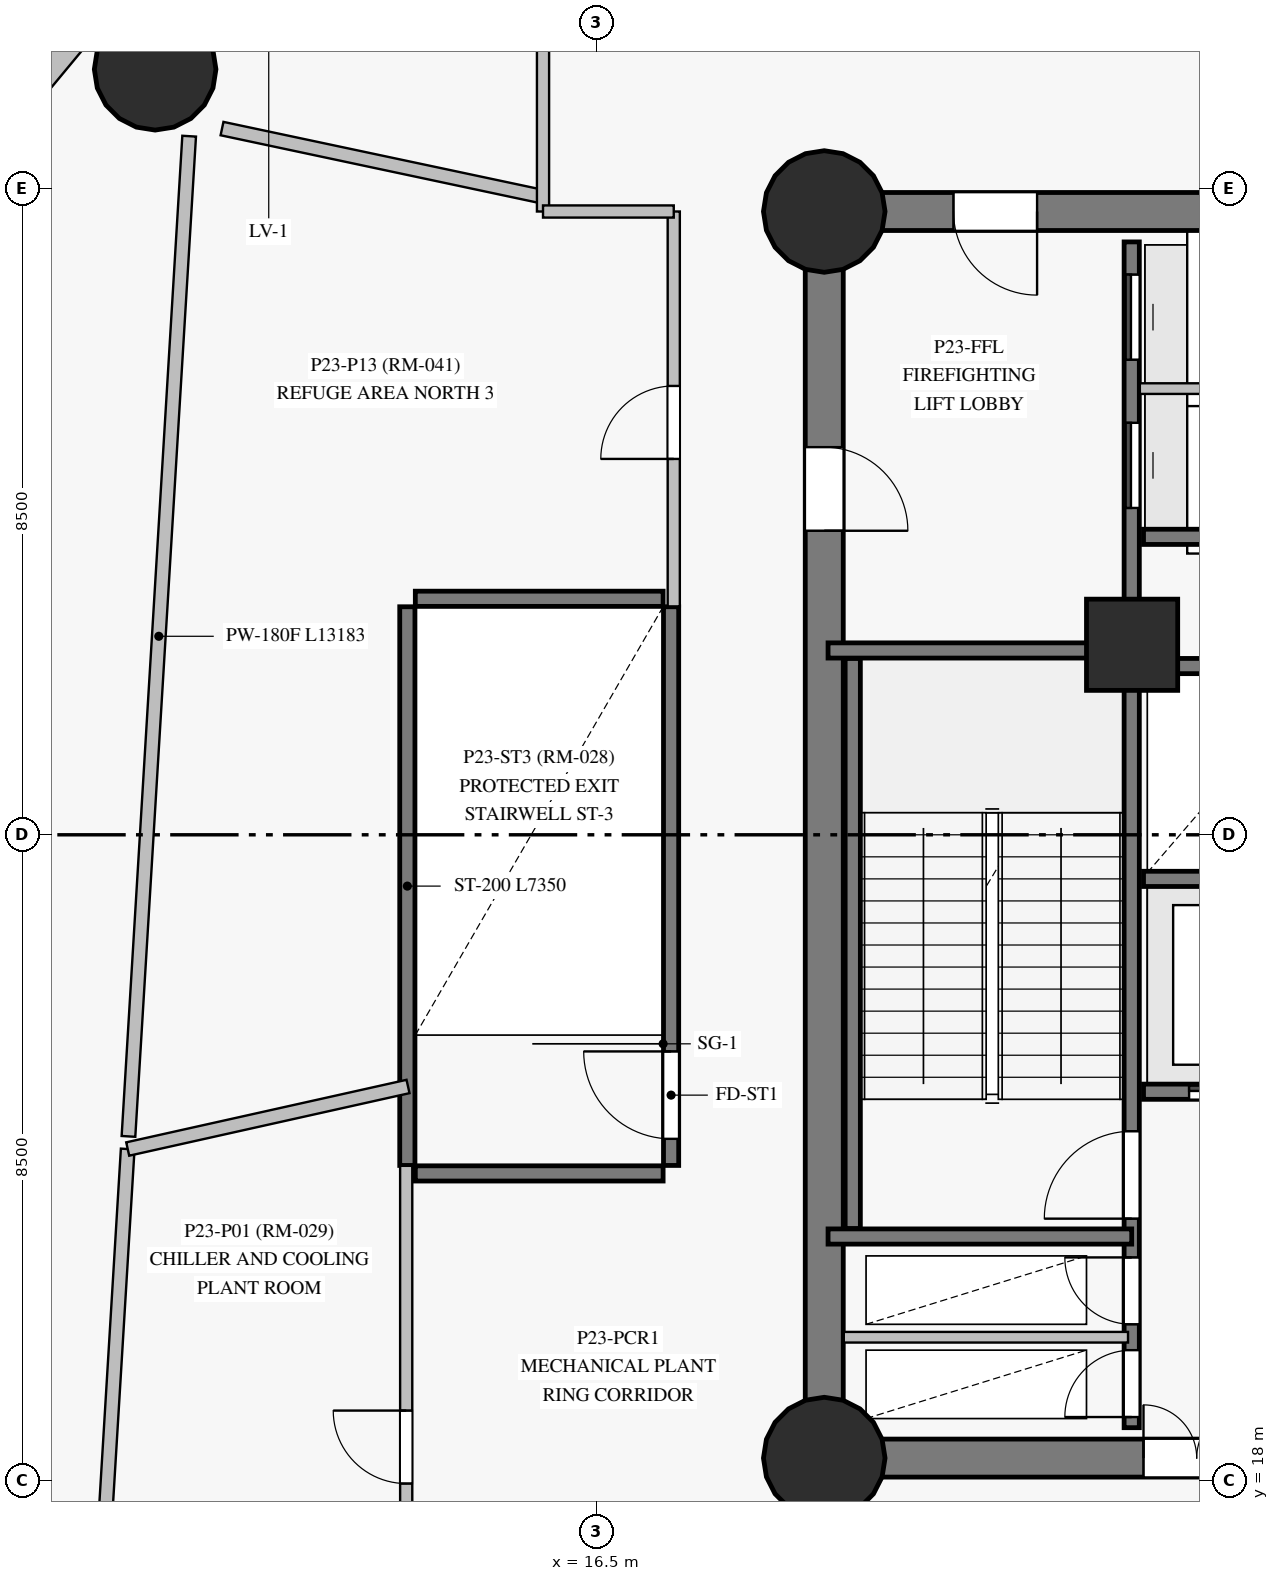
"""IFC4 building model, lengths in metres.
Left out: names, types, materials, properties, quantities, classifications, styles, units other than length and angle.
Written with IfcOpenShell. Run it as: python <this file> out.ifc"""

import sys

from ifc_helpers import new_model, si_unit, direction, frame, frame_2d, origin, origin_with_axes, origin_2d, place, context, subcontext, project, spatial, rectangle, circle, extrude, source, transform, mapped, element, fill, save


model = new_model("IFC4")
c1 = context("Model", 3, precision=1e-05, world=origin(), true_north=direction((0.0, 1.0)))
c2 = subcontext(c1, "Body", "Model", "MODEL_VIEW")
j1 = project(units=[si_unit("LENGTHUNIT", "METRE"), si_unit("PLANEANGLEUNIT", "RADIAN")], contexts=[c1])
p1 = place(None, origin())
s1 = spatial("IfcSite", under=j1, at=p1, CompositionType="ELEMENT")
p2 = place(p1, origin())
s2 = spatial("IfcBuilding", under=s1, at=p2, CompositionType="ELEMENT")
p3 = place(p2, frame((0.0, 0.0, 87.7)))
s3 = spatial("IfcBuildingStorey", under=s2, at=p3, CompositionType="ELEMENT", Elevation=87.7)
p4 = place(p3, frame((19.5, 18.3, 0.0), z_axis=(0.0, 0.0, 1.0), x_axis=(1.0, 0.0, 0.0)))
e1 = element("IfcWall", 1, at=p4, inside=s3, PredefinedType="SHEAR", context=c2, shape_type="SweptSolid", body=[
    extrude(rectangle(XDim=7.05, YDim=0.5, at=frame_2d((3.525, 0.0))), origin(), (0.0, 0.0, 1.0), 4.275),
])
p5 = place(p4, frame((4.2, 0.0, 0.0)))
e2 = element("IfcOpeningElement", 2, at=p5, cuts=e1, PredefinedType="OPENING", context=c2, shape_type="SweptSolid", body=[
    extrude(rectangle(XDim=1.4, YDim=2.2, at=frame_2d((0.7, 1.1))), frame((0.0, 0.26, 0.0), z_axis=(0.0, -1.0, 0.0), x_axis=(1.0, 0.0, 0.0)), (0.0, 0.0, 1.0), 0.52),
])
p6 = place(p3, frame((26.55, 34.7, 0.0), z_axis=(0.0, 0.0, 1.0), x_axis=(-1.0, 0.0, 0.0)))
e3 = element("IfcWall", 3, at=p6, inside=s3, PredefinedType="SHEAR", context=c2, shape_type="SweptSolid", body=[
    extrude(rectangle(XDim=7.05, YDim=0.5, at=frame_2d((3.525, 0.0))), origin(), (0.0, 0.0, 1.0), 4.275),
])
p7 = place(p6, frame((4.25, 0.0, 0.0)))
e4 = element("IfcOpeningElement", 4, at=p7, cuts=e3, PredefinedType="OPENING", context=c2, shape_type="SweptSolid", body=[
    extrude(rectangle(XDim=1.1, YDim=2.15, at=frame_2d((0.55, 1.075))), frame((0.0, 0.26, 0.0), z_axis=(0.0, -1.0, 0.0), x_axis=(1.0, 0.0, 0.0)), (0.0, 0.0, 1.0), 0.52),
])
p8 = place(p3, frame((19.5, 34.7, 0.0), z_axis=(0.0, 0.0, 1.0), x_axis=(0.0, -1.0, 0.0)))
e5 = element("IfcWall", 5, at=p8, inside=s3, PredefinedType="SHEAR", context=c2, shape_type="SweptSolid", body=[
    extrude(rectangle(XDim=16.4, YDim=0.5, at=frame_2d((8.2, 0.0))), origin(), (0.0, 0.0, 1.0), 4.275),
])
p9 = place(p8, frame((3.1, 0.0, 0.0)))
e6 = element("IfcOpeningElement", 6, at=p9, cuts=e5, PredefinedType="OPENING", context=c2, shape_type="SweptSolid", body=[
    extrude(rectangle(XDim=1.1, YDim=2.15, at=frame_2d((0.55, 1.075))), frame((0.0, 0.26, 0.0), z_axis=(0.0, -1.0, 0.0), x_axis=(1.0, 0.0, 0.0)), (0.0, 0.0, 1.0), 0.52),
])
m1 = source(origin_with_axes(), c2, "Body", "SweptSolid", [
    extrude(circle(Radius=0.8, at=origin_2d()), origin(), (0.0, 0.0, 1.0), 4.5),
])
for number, where, z_axis, x_axis in (
    (7, (19.5, 18.3, 0.0), (0.0, 0.0, 1.0), (1.0, 0.0, 0.0)),
    (8, (19.5, 34.7, 0.0), (0.0, 0.0, 1.0), (1.0, 0.0, 0.0)),
):
    element("IfcColumn", number, at=place(p3, frame(where, z_axis=z_axis, x_axis=x_axis)), inside=s3, PredefinedType="COLUMN", context=c2, shape_type="MappedRepresentation", body=[
        mapped(m1, transform((0.0, 0.0, 0.0), scale=1.0)),
    ])
m2 = source(origin_with_axes(), c2, "Body", "SweptSolid", [
    extrude(rectangle(XDim=1.2, YDim=1.2, at=origin_2d()), origin(), (0.0, 0.0, 1.0), 4.5),
])
p10 = place(p3, frame((23.55, 29.0, 0.0), z_axis=(0.0, 0.0, 1.0), x_axis=(1.0, 0.0, 0.0)))
e9 = element("IfcColumn", 9, at=p10, inside=s3, PredefinedType="COLUMN", context=c2, shape_type="MappedRepresentation", body=[
    mapped(m2, transform((0.0, 0.0, 0.0), scale=1.0)),
])
p11 = place(p3, frame((10.697, 36.571, 0.0), z_axis=(0.0, 0.0, 1.0), x_axis=(1.0, 0.0, 0.0)))
e10 = element("IfcColumn", 10, at=p11, inside=s3, PredefinedType="COLUMN", context=c2, shape_type="MappedRepresentation", body=[
    mapped(m1, transform((0.0, 0.0, 0.0), scale=1.0)),
])
p12 = place(p3, frame((15.915, 44.518, 0.0), z_axis=(0.0, 0.0, 1.0), x_axis=(-0.638496499315, -0.76962472697, 0.0)))
e11 = element("IfcWall", 11, at=p12, inside=s3, PredefinedType="SOLIDWALL", context=c2, shape_type="SweptSolid", body=[
    extrude(rectangle(XDim=11.663, YDim=0.32, at=frame_2d((5.831, 0.0))), origin(), (0.0, 0.0, 1.0), 4.275),
])
p13 = place(p3, frame((23.545, 18.7, 0.0), z_axis=(0.0, 0.0, 1.0), x_axis=(0.0, 1.0, 0.0)))
e12 = element("IfcWall", 12, at=p13, inside=s3, PredefinedType="SHEAR", context=c2, shape_type="SweptSolid", body=[
    extrude(rectangle(XDim=15.6, YDim=0.2, at=frame_2d((7.8, 0.0))), origin(), (0.0, 0.0, 1.0), 4.275),
])
p14 = place(p13, frame((2.75, 0.0, 0.0)))
e13 = element("IfcOpeningElement", 13, at=p14, cuts=e12, PredefinedType="OPENING", context=c2, shape_type="SweptSolid", body=[
    extrude(rectangle(XDim=1.15, YDim=2.15, at=frame_2d((0.575, 1.075))), frame((0.0, 0.11, 0.0), z_axis=(0.0, -1.0, 0.0), x_axis=(1.0, 0.0, 0.0)), (0.0, 0.0, 1.0), 0.22),
])
p15 = place(p13, frame((0.14, 0.0, 0.0)))
e14 = element("IfcOpeningElement", 14, at=p15, cuts=e12, PredefinedType="OPENING", context=c2, shape_type="SweptSolid", body=[
    extrude(rectangle(XDim=0.88, YDim=2.1, at=frame_2d((0.44, 1.05))), frame((0.0, 0.11, 0.0), z_axis=(0.0, -1.0, 0.0), x_axis=(1.0, 0.0, 0.0)), (0.0, 0.0, 1.0), 0.22),
])
p16 = place(p13, frame((1.36, 0.0, 0.0)))
e15 = element("IfcOpeningElement", 15, at=p16, cuts=e12, PredefinedType="OPENING", context=c2, shape_type="SweptSolid", body=[
    extrude(rectangle(XDim=0.88, YDim=2.1, at=frame_2d((0.44, 1.05))), frame((0.0, 0.11, 0.0), z_axis=(0.0, -1.0, 0.0), x_axis=(1.0, 0.0, 0.0)), (0.0, 0.0, 1.0), 0.22),
])
p17 = place(p13, frame((12.1, 0.0, 0.0)))
e16 = element("IfcOpeningElement", 16, at=p17, cuts=e12, PredefinedType="OPENING", context=c2, shape_type="SweptSolid", body=[
    extrude(rectangle(XDim=1.12, YDim=2.15, at=frame_2d((0.56, 1.075))), frame((0.0, 0.11, 0.0), z_axis=(0.0, -1.0, 0.0), x_axis=(1.0, 0.0, 0.0)), (0.0, 0.0, 1.0), 0.22),
])
p18 = place(p13, frame((14.05, 0.0, 0.0)))
e17 = element("IfcOpeningElement", 17, at=p18, cuts=e12, PredefinedType="OPENING", context=c2, shape_type="SweptSolid", body=[
    extrude(rectangle(XDim=1.12, YDim=2.15, at=frame_2d((0.56, 1.075))), frame((0.0, 0.11, 0.0), z_axis=(0.0, -1.0, 0.0), x_axis=(1.0, 0.0, 0.0)), (0.0, 0.0, 1.0), 0.22),
])
p19 = place(p3, frame((23.7, 23.12, 0.0), z_axis=(0.0, 0.0, 1.0), x_axis=(1.0, 0.0, 0.0)))
e18 = element("IfcWall", 18, at=p19, inside=s3, PredefinedType="SHEAR", context=c2, shape_type="SweptSolid", body=[
    extrude(rectangle(XDim=9.6, YDim=0.2, at=frame_2d((4.8, 0.0))), origin(), (0.0, 0.0, 1.0), 4.275),
])
p20 = place(p19, frame((0.6, 0.0, 0.0)))
e19 = element("IfcOpeningElement", 19, at=p20, cuts=e18, PredefinedType="OPENING", context=c2, shape_type="SweptSolid", body=[
    extrude(rectangle(XDim=1.1, YDim=2.15, at=frame_2d((0.55, 1.075))), frame((0.0, 0.11, 0.0), z_axis=(0.0, -1.0, 0.0), x_axis=(1.0, 0.0, 0.0)), (0.0, 0.0, 1.0), 0.22),
])
p21 = place(p19, frame((2.98, 0.0, 0.0)))
e20 = element("IfcOpeningElement", 20, at=p21, cuts=e18, PredefinedType="OPENING", context=c2, shape_type="SweptSolid", body=[
    extrude(rectangle(XDim=1.1, YDim=2.15, at=frame_2d((0.55, 1.075))), frame((0.0, 0.11, 0.0), z_axis=(0.0, -1.0, 0.0), x_axis=(1.0, 0.0, 0.0)), (0.0, 0.0, 1.0), 0.22),
])
p22 = place(p19, frame((5.36, 0.0, 0.0)))
e21 = element("IfcOpeningElement", 21, at=p22, cuts=e18, PredefinedType="OPENING", context=c2, shape_type="SweptSolid", body=[
    extrude(rectangle(XDim=1.1, YDim=2.15, at=frame_2d((0.55, 1.075))), frame((0.0, 0.11, 0.0), z_axis=(0.0, -1.0, 0.0), x_axis=(1.0, 0.0, 0.0)), (0.0, 0.0, 1.0), 0.22),
])
p23 = place(p19, frame((7.74, 0.0, 0.0)))
e22 = element("IfcOpeningElement", 22, at=p23, cuts=e18, PredefinedType="OPENING", context=c2, shape_type="SweptSolid", body=[
    extrude(rectangle(XDim=1.1, YDim=2.15, at=frame_2d((0.55, 1.075))), frame((0.0, 0.11, 0.0), z_axis=(0.0, -1.0, 0.0), x_axis=(1.0, 0.0, 0.0)), (0.0, 0.0, 1.0), 0.22),
])
for number, where, z_axis, x_axis in (
    (23, (23.7, 25.92, 0.0), (0.0, 0.0, 1.0), (1.0, 0.0, 0.0)),
    (24, (23.7, 28.72, 0.0), (0.0, 0.0, 1.0), (1.0, 0.0, 0.0)),
):
    element("IfcWall", number, at=place(p3, frame(where, z_axis=z_axis, x_axis=x_axis)), inside=s3, PredefinedType="SHEAR", context=c2, shape_type="SweptSolid", body=[
        extrude(rectangle(XDim=9.6, YDim=0.2, at=frame_2d((4.8, 0.0))), origin(), (0.0, 0.0, 1.0), 4.275),
    ])
p24 = place(p3, frame((19.875, 21.32, 0.0), z_axis=(0.0, 0.0, 1.0), x_axis=(0.0, 1.0, 0.0)))
e25 = element("IfcWall", 25, at=p24, inside=s3, PredefinedType="SHEAR", context=c2, shape_type="SweptSolid", body=[
    extrude(rectangle(XDim=7.5, YDim=0.2, at=frame_2d((3.75, 0.0))), origin(), (0.0, 0.0, 1.0), 4.275),
])
p25 = place(p3, frame((14.015, 22.15, 0.0), z_axis=(0.0, 0.0, 1.0), x_axis=(0.0, 1.0, 0.0)))
e26 = element("IfcWall", 26, at=p25, inside=s3, PredefinedType="SHEAR", context=c2, shape_type="SweptSolid", body=[
    extrude(rectangle(XDim=7.35, YDim=0.2, at=frame_2d((3.675, 0.0))), origin(), (0.0, 0.0, 1.0), 4.275),
])
p26 = place(p3, frame((17.485, 22.15, 0.0), z_axis=(0.0, 0.0, 1.0), x_axis=(0.0, 1.0, 0.0)))
e27 = element("IfcWall", 27, at=p26, inside=s3, PredefinedType="SHEAR", context=c2, shape_type="SweptSolid", body=[
    extrude(rectangle(XDim=7.35, YDim=0.2, at=frame_2d((3.675, 0.0))), origin(), (0.0, 0.0, 1.0), 4.275),
])
p27 = place(p26, frame((0.35, 0.0, 0.0)))
e28 = element("IfcOpeningElement", 28, at=p27, cuts=e27, PredefinedType="OPENING", context=c2, shape_type="SweptSolid", body=[
    extrude(rectangle(XDim=1.15, YDim=2.15, at=frame_2d((0.575, 1.075))), frame((0.0, 0.11, 0.0), z_axis=(0.0, -1.0, 0.0), x_axis=(1.0, 0.0, 0.0)), (0.0, 0.0, 1.0), 0.22),
])
for number, where, z_axis, x_axis in (
    (29, (19.55, 21.215, 0.0), (0.0, 0.0, 1.0), (1.0, 0.0, 0.0)),
    (30, (19.55, 28.925, 0.0), (0.0, 0.0, 1.0), (1.0, 0.0, 0.0)),
):
    element("IfcWall", number, at=place(p3, frame(where, z_axis=z_axis, x_axis=x_axis)), inside=s3, PredefinedType="SHEAR", context=c2, shape_type="SweptSolid", body=[
        extrude(rectangle(XDim=3.995, YDim=0.2, at=frame_2d((1.998, 0.0))), origin(), (0.0, 0.0, 1.0), 4.275),
    ])
for number, where, z_axis, x_axis in (
    (31, (14.12, 22.045, 0.0), (0.0, 0.0, 1.0), (1.0, 0.0, 0.0)),
    (32, (14.12, 29.605, 0.0), (0.0, 0.0, 1.0), (1.0, 0.0, 0.0)),
):
    element("IfcWall", number, at=place(p3, frame(where, z_axis=z_axis, x_axis=x_axis)), inside=s3, PredefinedType="SHEAR", context=c2, shape_type="SweptSolid", body=[
        extrude(rectangle(XDim=3.26, YDim=0.2, at=frame_2d((1.63, 0.0))), origin(), (0.0, 0.0, 1.0), 4.275),
    ])
p28 = place(p3, frame((23.7, 30.42, 0.0), z_axis=(0.0, 0.0, 1.0), x_axis=(1.0, 0.0, 0.0)))
e33 = element("IfcWall", 33, at=p28, inside=s3, PredefinedType="SHEAR", context=c2, shape_type="SweptSolid", body=[
    extrude(rectangle(XDim=2.78, YDim=0.2, at=frame_2d((1.39, 0.0))), origin(), (0.0, 0.0, 1.0), 4.275),
])
p29 = place(p3, frame((10.346, 22.532, 0.0), z_axis=(0.0, 0.0, 1.0), x_axis=(0.060558802641, 0.998164631422, 0.0)))
e34 = element("IfcWall", 34, at=p29, inside=s3, PredefinedType="PARTITIONING", context=c2, shape_type="SweptSolid", body=[
    extrude(rectangle(XDim=13.183, YDim=0.18, at=frame_2d((6.591, 0.0))), origin(), (0.0, 0.0, 1.0), 3.375),
])
p30 = place(p3, frame((9.817, 13.808, 0.0), z_axis=(0.0, 0.0, 1.0), x_axis=(0.060568138709, 0.998164064958, 0.0)))
e35 = element("IfcWall", 35, at=p30, inside=s3, PredefinedType="PARTITIONING", context=c2, shape_type="SweptSolid", body=[
    extrude(rectangle(XDim=8.573, YDim=0.18, at=frame_2d((4.287, 0.0))), origin(), (0.0, 0.0, 1.0), 3.375),
])
p31 = place(p3, frame((14.0, 15.1, 0.0), z_axis=(0.0, 0.0, 1.0), x_axis=(0.0, 1.0, 0.0)))
e36 = element("IfcWall", 36, at=p31, inside=s3, PredefinedType="PARTITIONING", context=c2, shape_type="SweptSolid", body=[
    extrude(rectangle(XDim=7.045, YDim=0.16, at=frame_2d((3.522, 0.0))), origin(), (0.0, 0.0, 1.0), 4.275),
])
p32 = place(p31, frame((2.865, 0.0, 0.0)))
e37 = element("IfcOpeningElement", 37, at=p32, cuts=e36, PredefinedType="OPENING", context=c2, shape_type="SweptSolid", body=[
    extrude(rectangle(XDim=0.96, YDim=2.15, at=frame_2d((0.48, 1.075))), frame((0.0, 0.09, 0.0), z_axis=(0.0, -1.0, 0.0), x_axis=(1.0, 0.0, 0.0)), (0.0, 0.0, 1.0), 0.18),
])
p33 = place(p3, frame((17.52, 29.505, 0.0), z_axis=(0.0, 0.0, 1.0), x_axis=(0.0, 1.0, 0.0)))
e38 = element("IfcWall", 38, at=p33, inside=s3, PredefinedType="PARTITIONING", context=c2, shape_type="SweptSolid", body=[
    extrude(rectangle(XDim=5.195, YDim=0.16, at=frame_2d((2.598, 0.0))), origin(), (0.0, 0.0, 1.0), 4.275),
])
p34 = place(p33, frame((1.94, 0.0, 0.0)))
e39 = element("IfcOpeningElement", 39, at=p34, cuts=e38, PredefinedType="OPENING", context=c2, shape_type="SweptSolid", body=[
    extrude(rectangle(XDim=0.96, YDim=2.15, at=frame_2d((0.48, 1.075))), frame((0.0, 0.09, 0.0), z_axis=(0.0, -1.0, 0.0), x_axis=(1.0, 0.0, 0.0)), (0.0, 0.0, 1.0), 0.18),
])
p35 = place(p3, frame((11.577, 35.791, 0.0), z_axis=(0.0, 0.0, 1.0), x_axis=(0.978151143178, -0.20789502423, 0.0)))
e40 = element("IfcWall", 40, at=p35, inside=s3, PredefinedType="PARTITIONING", context=c2, shape_type="SweptSolid", body=[
    extrude(rectangle(XDim=4.347, YDim=0.18, at=frame_2d((2.174, 0.0))), origin(), (0.0, 0.0, 1.0), 2.775),
])
p36 = place(p3, frame((10.336, 22.366, 0.0), z_axis=(0.0, 0.0, 1.0), x_axis=(0.976004273592, 0.21775136723, 0.0)))
e41 = element("IfcWall", 41, at=p36, inside=s3, PredefinedType="PARTITIONING", context=c2, shape_type="SweptSolid", body=[
    extrude(rectangle(XDim=3.778, YDim=0.18, at=frame_2d((1.889, 0.0))), origin(), (0.0, 0.0, 1.0), 4.275),
])
p37 = place(p3, frame((19.757, 19.89, 0.0), z_axis=(0.0, 0.0, 1.0), x_axis=(1.0, 0.0, 0.0)))
e42 = element("IfcWall", 42, at=p37, inside=s3, PredefinedType="PARTITIONING", context=c2, shape_type="SweptSolid", body=[
    extrude(rectangle(XDim=3.739, YDim=0.14, at=frame_2d((1.87, 0.0))), origin(), (0.0, 0.0, 1.0), 4.275),
])
p38 = place(p3, frame((15.8, 34.7, 0.0), z_axis=(0.0, 0.0, 1.0), x_axis=(0.0, 1.0, 0.0)))
e43 = element("IfcWall", 43, at=p38, inside=s3, PredefinedType="PARTITIONING", context=c2, shape_type="SweptSolid", body=[
    extrude(rectangle(XDim=3.4, YDim=0.16, at=frame_2d((1.7, 0.0))), origin(), (0.0, 0.0, 1.0), 2.875),
])
p39 = place(p3, frame((23.652, 32.37, 0.0), z_axis=(0.0, 0.0, 1.0), x_axis=(1.0, 0.0, 0.0)))
e44 = element("IfcWall", 44, at=p39, inside=s3, PredefinedType="PARTITIONING", context=c2, shape_type="SweptSolid", body=[
    extrude(rectangle(XDim=2.828, YDim=0.14, at=frame_2d((1.414, 0.0))), origin(), (0.0, 0.0, 1.0), 4.275),
])
p40 = place(p3, frame((17.52, 34.7, 0.0), z_axis=(0.0, 0.0, 1.0), x_axis=(-1.0, 0.0, 0.0)))
e45 = element("IfcWall", 45, at=p40, inside=s3, PredefinedType="PARTITIONING", context=c2, shape_type="SweptSolid", body=[
    extrude(rectangle(XDim=1.72, YDim=0.16, at=frame_2d((0.86, 0.0))), origin(), (0.0, 0.0, 1.0), 2.775),
])
m3 = source(origin_with_axes(), c2, "Body", "SweptSolid", [
    extrude(rectangle(XDim=1.15, YDim=2.15, at=frame_2d((0.575, 1.075))), frame((0.0, 0.025, 0.0), z_axis=(0.0, -1.0, 0.0), x_axis=(1.0, 0.0, 0.0)), (0.0, 0.0, 1.0), 0.05),
])
p41 = place(p14, origin())
e46 = element("IfcDoor", 46, at=p41, inside=s3, OperationType="SINGLE_SWING_LEFT", PredefinedType="DOOR", context=c2, shape_type="MappedRepresentation", body=[
    mapped(m3, transform((0.0, 0.0, 0.0), scale=1.0)),
])
fill(e13, e46)
m4 = source(origin_with_axes(), c2, "Body", "SweptSolid", [
    extrude(rectangle(XDim=1.1, YDim=2.15, at=frame_2d((0.55, 1.075))), frame((0.0, 0.025, 0.0), z_axis=(0.0, -1.0, 0.0), x_axis=(1.0, 0.0, 0.0)), (0.0, 0.0, 1.0), 0.05),
])
p42 = place(p7, origin())
e47 = element("IfcDoor", 47, at=p42, inside=s3, OperationType="SINGLE_SWING_LEFT", PredefinedType="DOOR", context=c2, shape_type="MappedRepresentation", body=[
    mapped(m4, transform((0.0, 0.0, 0.0), scale=1.0)),
])
fill(e4, e47)
p43 = place(p9, origin())
e48 = element("IfcDoor", 48, at=p43, inside=s3, OperationType="SINGLE_SWING_RIGHT", PredefinedType="DOOR", context=c2, shape_type="MappedRepresentation", body=[
    mapped(m4, transform((0.0, 0.0, 0.0), scale=1.0)),
])
fill(e6, e48)
m5 = source(origin_with_axes(), c2, "Body", "SweptSolid", [
    extrude(rectangle(XDim=0.88, YDim=2.1, at=frame_2d((0.44, 1.05))), frame((0.0, 0.025, 0.0), z_axis=(0.0, -1.0, 0.0), x_axis=(1.0, 0.0, 0.0)), (0.0, 0.0, 1.0), 0.05),
])
p44 = place(p15, origin())
e49 = element("IfcDoor", 49, at=p44, inside=s3, OperationType="SINGLE_SWING_LEFT", PredefinedType="DOOR", context=c2, shape_type="MappedRepresentation", body=[
    mapped(m5, transform((0.0, 0.0, 0.0), scale=1.0)),
])
fill(e14, e49)
p45 = place(p16, origin())
e50 = element("IfcDoor", 50, at=p45, inside=s3, OperationType="SINGLE_SWING_RIGHT", PredefinedType="DOOR", context=c2, shape_type="MappedRepresentation", body=[
    mapped(m5, transform((0.0, 0.0, 0.0), scale=1.0)),
])
fill(e15, e50)
m6 = source(origin_with_axes(), c2, "Body", "SweptSolid", [
    extrude(rectangle(XDim=1.4, YDim=2.2, at=frame_2d((0.7, 1.1))), frame((0.0, 0.025, 0.0), z_axis=(0.0, -1.0, 0.0), x_axis=(1.0, 0.0, 0.0)), (0.0, 0.0, 1.0), 0.05),
])
p46 = place(p5, origin())
e51 = element("IfcDoor", 51, at=p46, inside=s3, OperationType="DOUBLE_DOOR_SINGLE_SWING", PredefinedType="DOOR", context=c2, shape_type="MappedRepresentation", body=[
    mapped(m6, transform((0.0, 0.0, 0.0), scale=1.0)),
])
fill(e2, e51)
p47 = place(p20, origin())
e52 = element("IfcDoor", 52, at=p47, inside=s3, OperationType="SLIDING_TO_LEFT", PredefinedType="DOOR", context=c2, shape_type="MappedRepresentation", body=[
    mapped(m4, transform((0.0, 0.0, 0.0), scale=1.0)),
])
fill(e19, e52)
m7 = source(origin_with_axes(), c2, "Body", "SweptSolid", [
    extrude(rectangle(XDim=1.12, YDim=2.15, at=frame_2d((0.56, 1.075))), frame((0.0, 0.025, 0.0), z_axis=(0.0, -1.0, 0.0), x_axis=(1.0, 0.0, 0.0)), (0.0, 0.0, 1.0), 0.05),
])
p48 = place(p17, origin())
e53 = element("IfcDoor", 53, at=p48, inside=s3, OperationType="SLIDING_TO_LEFT", PredefinedType="DOOR", context=c2, shape_type="MappedRepresentation", body=[
    mapped(m7, transform((0.0, 0.0, 0.0), scale=1.0)),
])
fill(e16, e53)
p49 = place(p18, origin())
e54 = element("IfcDoor", 54, at=p49, inside=s3, OperationType="SLIDING_TO_RIGHT", PredefinedType="DOOR", context=c2, shape_type="MappedRepresentation", body=[
    mapped(m7, transform((0.0, 0.0, 0.0), scale=1.0)),
])
fill(e17, e54)
p50 = place(p27, origin())
e55 = element("IfcDoor", 55, at=p50, inside=s3, OperationType="SINGLE_SWING_RIGHT", PredefinedType="DOOR", context=c2, shape_type="MappedRepresentation", body=[
    mapped(m3, transform((0.0, 0.0, 0.0), scale=1.0)),
])
fill(e28, e55)
m8 = source(origin_with_axes(), c2, "Body", "SweptSolid", [
    extrude(rectangle(XDim=0.96, YDim=2.15, at=frame_2d((0.48, 1.075))), frame((0.0, 0.025, 0.0), z_axis=(0.0, -1.0, 0.0), x_axis=(1.0, 0.0, 0.0)), (0.0, 0.0, 1.0), 0.05),
])
p51 = place(p34, origin())
e56 = element("IfcDoor", 56, at=p51, inside=s3, OperationType="SINGLE_SWING_LEFT", PredefinedType="DOOR", context=c2, shape_type="MappedRepresentation", body=[
    mapped(m8, transform((0.0, 0.0, 0.0), scale=1.0)),
])
fill(e39, e56)
p52 = place(p32, origin())
e57 = element("IfcDoor", 57, at=p52, inside=s3, OperationType="SINGLE_SWING_RIGHT", PredefinedType="DOOR", context=c2, shape_type="MappedRepresentation", body=[
    mapped(m8, transform((0.0, 0.0, 0.0), scale=1.0)),
])
fill(e37, e57)
save(model, sys.argv[1])
